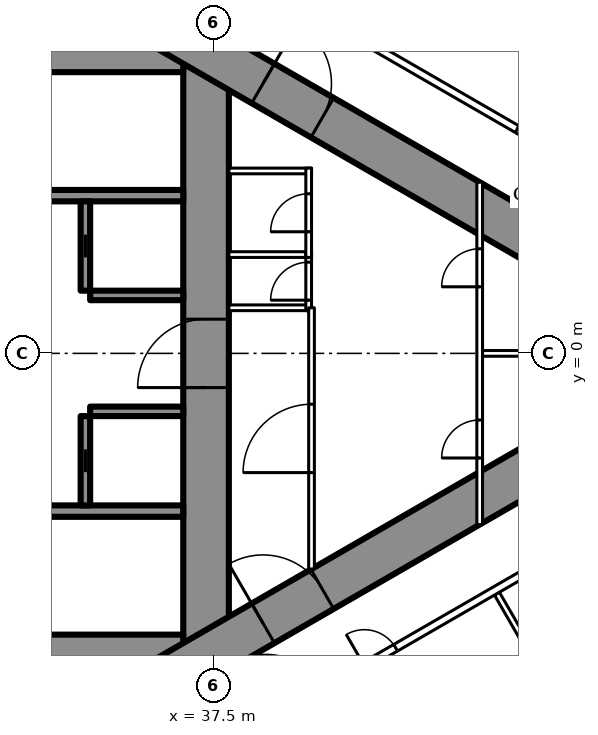
"""IFC4 building model, lengths in metres.
Left out: names, types, materials, properties, quantities, classifications, styles, units other than length and angle.
Written with IfcOpenShell. Run it as: python <this file> out.ifc"""

import sys

from ifc_helpers import new_model, si_unit, direction, frame, frame_2d, origin, place, context, subcontext, project, spatial, rectangle, extrude, element, fill, save


model = new_model("IFC4")
c1 = context("Model", 3, precision=1e-05, world=origin(), true_north=direction((0.0, 1.0)))
c2 = subcontext(c1, "Body", "Model", "MODEL_VIEW")
j1 = project(units=[si_unit("LENGTHUNIT", "METRE"), si_unit("PLANEANGLEUNIT", "RADIAN")], contexts=[c1])
p1 = place(None, origin())
s1 = spatial("IfcSite", under=j1, at=p1, CompositionType="ELEMENT")
p2 = place(p1, origin())
s2 = spatial("IfcBuilding", under=s1, at=p2, CompositionType="ELEMENT")
p3 = place(p2, frame((0.0, 0.0, 90.6)))
s3 = spatial("IfcBuildingStorey", under=s2, at=p3, CompositionType="ELEMENT", Elevation=90.6)
p4 = place(p3, frame((37.3, -8.6, 0.0), z_axis=(0.0, 0.0, 1.0), x_axis=(0.0, 1.0, 0.0)))
e1 = element("IfcWall", 1, at=p4, inside=s3, PredefinedType="SHEAR", context=c2, shape_type="SweptSolid", body=[
    extrude(rectangle(XDim=17.2, YDim=1.2, at=frame_2d((8.6, 0.0))), origin(), (0.0, 0.0, 1.0), 3.5),
])
p5 = place(p4, frame((7.7, 0.0, 0.0)))
e2 = element("IfcOpeningElement", 2, at=p5, cuts=e1, PredefinedType="OPENING", context=c2, shape_type="SweptSolid", body=[
    extrude(rectangle(XDim=1.8, YDim=2.2, at=frame_2d((0.9, 1.1))), frame((0.0, 0.61, 0.0), z_axis=(0.0, -1.0, 0.0), x_axis=(1.0, 0.0, 0.0)), (0.0, 0.0, 1.0), 1.22),
])
p6 = place(p3, frame((28.3, -8.0, 0.0), z_axis=(0.0, 0.0, 1.0), x_axis=(1.0, 0.0, 0.0)))
e3 = element("IfcWall", 3, at=p6, inside=s3, PredefinedType="SHEAR", context=c2, shape_type="SweptSolid", body=[
    extrude(rectangle(XDim=8.4, YDim=1.2, at=frame_2d((4.2, 0.0))), origin(), (0.0, 0.0, 1.0), 3.5),
])
p7 = place(p6, frame((0.25, 0.0, 0.0)))
e4 = element("IfcOpeningElement", 4, at=p7, cuts=e3, PredefinedType="OPENING", context=c2, shape_type="SweptSolid", body=[
    extrude(rectangle(XDim=1.0, YDim=2.2, at=frame_2d((0.5, 1.1))), frame((0.0, 0.61, 0.0), z_axis=(0.0, -1.0, 0.0), x_axis=(1.0, 0.0, 0.0)), (0.0, 0.0, 1.0), 1.22),
])
p8 = place(p3, frame((28.3, 8.0, 0.0), z_axis=(0.0, 0.0, 1.0), x_axis=(1.0, 0.0, 0.0)))
e5 = element("IfcWall", 5, at=p8, inside=s3, PredefinedType="SHEAR", context=c2, shape_type="SweptSolid", body=[
    extrude(rectangle(XDim=8.4, YDim=1.2, at=frame_2d((4.2, 0.0))), origin(), (0.0, 0.0, 1.0), 3.5),
])
p9 = place(p8, frame((0.25, 0.0, 0.0)))
e6 = element("IfcOpeningElement", 6, at=p9, cuts=e5, PredefinedType="OPENING", context=c2, shape_type="SweptSolid", body=[
    extrude(rectangle(XDim=1.0, YDim=2.2, at=frame_2d((0.5, 1.1))), frame((0.0, 0.61, 0.0), z_axis=(0.0, -1.0, 0.0), x_axis=(1.0, 0.0, 0.0)), (0.0, 0.0, 1.0), 1.22),
])
for number, where, z_axis, x_axis in (
    (7, (28.3, -4.15, 0.0), (0.0, 0.0, 1.0), (1.0, 0.0, 0.0)),
    (8, (28.3, 4.15, 0.0), (0.0, 0.0, 1.0), (1.0, 0.0, 0.0)),
):
    element("IfcWall", number, at=place(p3, frame(where, z_axis=z_axis, x_axis=x_axis)), inside=s3, PredefinedType="SHEAR", context=c2, shape_type="SweptSolid", body=[
        extrude(rectangle(XDim=8.4, YDim=0.3, at=frame_2d((4.2, 0.0))), origin(), (0.0, 0.0, 1.0), 3.5),
    ])
p10 = place(p3, frame((34.125, -4.0, 0.0), z_axis=(0.0, 0.0, 1.0), x_axis=(0.0, 1.0, 0.0)))
e9 = element("IfcWall", 9, at=p10, inside=s3, PredefinedType="SHEAR", context=c2, shape_type="SweptSolid", body=[
    extrude(rectangle(XDim=2.35, YDim=0.25, at=frame_2d((1.175, 0.0))), origin(), (0.0, 0.0, 1.0), 3.5),
])
p11 = place(p10, frame((0.875, 0.0, 0.0)))
e10 = element("IfcOpeningElement", 10, at=p11, cuts=e9, PredefinedType="OPENING", context=c2, shape_type="SweptSolid", body=[
    extrude(rectangle(XDim=0.6, YDim=2.0, at=frame_2d((0.3, 1.0))), frame((0.0, 0.135, 0.0), z_axis=(0.0, -1.0, 0.0), x_axis=(1.0, 0.0, 0.0)), (0.0, 0.0, 1.0), 0.27),
])
p12 = place(p3, frame((34.25, -1.525, 0.0), z_axis=(0.0, 0.0, 1.0), x_axis=(1.0, 0.0, 0.0)))
e11 = element("IfcWall", 11, at=p12, inside=s3, PredefinedType="SHEAR", context=c2, shape_type="SweptSolid", body=[
    extrude(rectangle(XDim=2.45, YDim=0.25, at=frame_2d((1.225, 0.0))), origin(), (0.0, 0.0, 1.0), 3.5),
])
p13 = place(p3, frame((34.125, 1.65, 0.0), z_axis=(0.0, 0.0, 1.0), x_axis=(0.0, 1.0, 0.0)))
e12 = element("IfcWall", 12, at=p13, inside=s3, PredefinedType="SHEAR", context=c2, shape_type="SweptSolid", body=[
    extrude(rectangle(XDim=2.35, YDim=0.25, at=frame_2d((1.175, 0.0))), origin(), (0.0, 0.0, 1.0), 3.5),
])
p14 = place(p13, frame((0.875, 0.0, 0.0)))
e13 = element("IfcOpeningElement", 13, at=p14, cuts=e12, PredefinedType="OPENING", context=c2, shape_type="SweptSolid", body=[
    extrude(rectangle(XDim=0.6, YDim=2.0, at=frame_2d((0.3, 1.0))), frame((0.0, 0.135, 0.0), z_axis=(0.0, -1.0, 0.0), x_axis=(1.0, 0.0, 0.0)), (0.0, 0.0, 1.0), 0.27),
])
p15 = place(p3, frame((34.25, 1.525, 0.0), z_axis=(0.0, 0.0, 1.0), x_axis=(1.0, 0.0, 0.0)))
e14 = element("IfcWall", 14, at=p15, inside=s3, PredefinedType="SHEAR", context=c2, shape_type="SweptSolid", body=[
    extrude(rectangle(XDim=2.45, YDim=0.25, at=frame_2d((1.225, 0.0))), origin(), (0.0, 0.0, 1.0), 3.5),
])
p16 = place(p3, frame((27.2, -13.8, 0.0), z_axis=(0.0, 0.0, 1.0), x_axis=(0.866027159892, 0.499996958321, 0.0)))
e15 = element("IfcWall", 15, at=p16, inside=s3, PredefinedType="SHEAR", context=c2, shape_type="SweptSolid", body=[
    extrude(rectangle(XDim=27.947, YDim=1.2, at=frame_2d((13.973, 0.0))), origin(), (0.0, 0.0, 1.0), 3.5),
])
p17 = place(p16, frame((4.6, 0.0, 0.0)))
e16 = element("IfcOpeningElement", 16, at=p17, cuts=e15, PredefinedType="OPENING", context=c2, shape_type="SweptSolid", body=[
    extrude(rectangle(XDim=1.0, YDim=2.2, at=frame_2d((0.5, 1.1))), frame((0.0, 0.61, 0.0), z_axis=(0.0, -1.0, 0.0), x_axis=(1.0, 0.0, 0.0)), (0.0, 0.0, 1.0), 1.22),
])
p18 = place(p16, frame((13.395, 0.0, 0.0)))
e17 = element("IfcOpeningElement", 17, at=p18, cuts=e15, PredefinedType="OPENING", context=c2, shape_type="SweptSolid", body=[
    extrude(rectangle(XDim=1.8, YDim=2.2, at=frame_2d((0.9, 1.1))), frame((0.0, 0.61, 0.0), z_axis=(0.0, -1.0, 0.0), x_axis=(1.0, 0.0, 0.0)), (0.0, 0.0, 1.0), 1.22),
])
p19 = place(p3, frame((27.2, 13.8, 0.0), z_axis=(0.0, 0.0, 1.0), x_axis=(0.866024515034, -0.500001539357, 0.0)))
e18 = element("IfcWall", 18, at=p19, inside=s3, PredefinedType="SHEAR", context=c2, shape_type="SweptSolid", body=[
    extrude(rectangle(XDim=26.907, YDim=1.2, at=frame_2d((13.454, 0.0))), origin(), (0.0, 0.0, 1.0), 3.5),
])
p20 = place(p19, frame((4.6, 0.0, 0.0)))
e19 = element("IfcOpeningElement", 19, at=p20, cuts=e18, PredefinedType="OPENING", context=c2, shape_type="SweptSolid", body=[
    extrude(rectangle(XDim=1.0, YDim=2.2, at=frame_2d((0.5, 1.1))), frame((0.0, 0.61, 0.0), z_axis=(0.0, -1.0, 0.0), x_axis=(1.0, 0.0, 0.0)), (0.0, 0.0, 1.0), 1.22),
])
p21 = place(p19, frame((13.395, 0.0, 0.0)))
e20 = element("IfcOpeningElement", 20, at=p21, cuts=e18, PredefinedType="OPENING", context=c2, shape_type="SweptSolid", body=[
    extrude(rectangle(XDim=1.8, YDim=2.2, at=frame_2d((0.9, 1.1))), frame((0.0, 0.61, 0.0), z_axis=(0.0, -1.0, 0.0), x_axis=(1.0, 0.0, 0.0)), (0.0, 0.0, 1.0), 1.22),
])
p22 = place(p3, frame((44.954, -6.321, 0.0), z_axis=(0.0, 0.0, 1.0), x_axis=(0.500018676722, -0.866014620505, 0.0)))
e21 = element("IfcWall", 21, at=p22, inside=s3, PredefinedType="PARTITIONING", context=c2, shape_type="SweptSolid", body=[
    extrude(rectangle(XDim=8.704, YDim=0.15, at=frame_2d((4.352, 0.0))), origin(), (0.0, 0.0, 1.0), 2.2),
])
p23 = place(p3, frame((37.96, -10.243, 0.0), z_axis=(0.0, 0.0, 1.0), x_axis=(0.866026429433, 0.499998223521, 0.0)))
e22 = element("IfcWall", 22, at=p23, inside=s3, PredefinedType="PARTITIONING", context=c2, shape_type="SweptSolid", body=[
    extrude(rectangle(XDim=20.487, YDim=0.2, at=frame_2d((10.243, 0.0))), origin(), (0.0, 0.0, 1.0), 3.25),
])
p24 = place(p23, frame((4.047, 0.0, 0.0)))
e23 = element("IfcOpeningElement", 23, at=p24, cuts=e22, PredefinedType="OPENING", context=c2, shape_type="SweptSolid", body=[
    extrude(rectangle(XDim=0.95, YDim=2.2, at=frame_2d((0.475, 1.1))), frame((0.0, 0.11, 0.0), z_axis=(0.0, -1.0, 0.0), x_axis=(1.0, 0.0, 0.0)), (0.0, 0.0, 1.0), 0.22),
])
p25 = place(p23, frame((11.04, 0.0, 0.0)))
e24 = element("IfcOpeningElement", 24, at=p25, cuts=e22, PredefinedType="OPENING", context=c2, shape_type="SweptSolid", body=[
    extrude(rectangle(XDim=0.95, YDim=2.2, at=frame_2d((0.475, 1.1))), frame((0.0, 0.11, 0.0), z_axis=(0.0, -1.0, 0.0), x_axis=(1.0, 0.0, 0.0)), (0.0, 0.0, 1.0), 0.22),
])
p26 = place(p23, frame((13.035, 0.0, 0.0)))
e25 = element("IfcOpeningElement", 25, at=p26, cuts=e22, PredefinedType="OPENING", context=c2, shape_type="SweptSolid", body=[
    extrude(rectangle(XDim=0.95, YDim=2.2, at=frame_2d((0.475, 1.1))), frame((0.0, 0.11, 0.0), z_axis=(0.0, -1.0, 0.0), x_axis=(1.0, 0.0, 0.0)), (0.0, 0.0, 1.0), 0.22),
])
p27 = place(p23, frame((17.085, 0.0, 0.0)))
e26 = element("IfcOpeningElement", 26, at=p27, cuts=e22, PredefinedType="OPENING", context=c2, shape_type="SweptSolid", body=[
    extrude(rectangle(XDim=0.95, YDim=2.2, at=frame_2d((0.475, 1.1))), frame((0.0, 0.11, 0.0), z_axis=(0.0, -1.0, 0.0), x_axis=(1.0, 0.0, 0.0)), (0.0, 0.0, 1.0), 0.22),
])
p28 = place(p23, frame((1.048, 0.0, 0.0)))
e27 = element("IfcOpeningElement", 27, at=p28, cuts=e22, PredefinedType="OPENING", context=c2, shape_type="SweptSolid", body=[
    extrude(rectangle(XDim=1.8, YDim=2.2, at=frame_2d((0.9, 1.1))), frame((0.0, 0.11, 0.0), z_axis=(0.0, -1.0, 0.0), x_axis=(1.0, 0.0, 0.0)), (0.0, 0.0, 1.0), 0.22),
])
p29 = place(p3, frame((36.834, 10.894, 0.0), z_axis=(0.0, 0.0, 1.0), x_axis=(0.866028157229, -0.499995230863, 0.0)))
e28 = element("IfcWall", 28, at=p29, inside=s3, PredefinedType="PARTITIONING", context=c2, shape_type="SweptSolid", body=[
    extrude(rectangle(XDim=21.667, YDim=0.2, at=frame_2d((10.833, 0.0))), origin(), (0.0, 0.0, 1.0), 3.25),
])
p30 = place(p29, frame((14.04, 0.0, 0.0)))
e29 = element("IfcOpeningElement", 29, at=p30, cuts=e28, PredefinedType="OPENING", context=c2, shape_type="SweptSolid", body=[
    extrude(rectangle(XDim=0.95, YDim=2.2, at=frame_2d((0.475, 1.1))), frame((0.0, 0.11, 0.0), z_axis=(0.0, -1.0, 0.0), x_axis=(1.0, 0.0, 0.0)), (0.0, 0.0, 1.0), 0.22),
])
p31 = place(p29, frame((9.99, 0.0, 0.0)))
e30 = element("IfcOpeningElement", 30, at=p31, cuts=e28, PredefinedType="OPENING", context=c2, shape_type="SweptSolid", body=[
    extrude(rectangle(XDim=0.95, YDim=2.2, at=frame_2d((0.475, 1.1))), frame((0.0, 0.11, 0.0), z_axis=(0.0, -1.0, 0.0), x_axis=(1.0, 0.0, 0.0)), (0.0, 0.0, 1.0), 0.22),
])
p32 = place(p29, frame((3.35, 0.0, 0.0)))
e31 = element("IfcOpeningElement", 31, at=p32, cuts=e28, PredefinedType="OPENING", context=c2, shape_type="SweptSolid", body=[
    extrude(rectangle(XDim=1.0, YDim=2.2, at=frame_2d((0.5, 1.1))), frame((0.0, 0.11, 0.0), z_axis=(0.0, -1.0, 0.0), x_axis=(1.0, 0.0, 0.0)), (0.0, 0.0, 1.0), 0.22),
])
for number, where, z_axis, x_axis in (
    (32, (37.9, 1.2, 0.0), (0.0, 0.0, 1.0), (1.0, 0.0, 0.0)),
    (33, (37.9, 2.6, 0.0), (0.0, 0.0, 1.0), (1.0, 0.0, 0.0)),
    (34, (37.9, 4.8, 0.0), (0.0, 0.0, 1.0), (1.0, 0.0, 0.0)),
):
    element("IfcWall", number, at=place(p3, frame(where, z_axis=z_axis, x_axis=x_axis)), inside=s3, PredefinedType="PARTITIONING", context=c2, shape_type="SweptSolid", body=[
        extrude(rectangle(XDim=2.175, YDim=0.15, at=frame_2d((1.087, 0.0))), origin(), (0.0, 0.0, 1.0), 3.25),
    ])
p33 = place(p3, frame((40.0, 1.125, 0.0), z_axis=(0.0, 0.0, 1.0), x_axis=(0.0, 1.0, 0.0)))
e35 = element("IfcWall", 35, at=p33, inside=s3, PredefinedType="PARTITIONING", context=c2, shape_type="SweptSolid", body=[
    extrude(rectangle(XDim=1.55, YDim=0.15, at=frame_2d((0.775, 0.0))), origin(), (0.0, 0.0, 1.0), 3.25),
])
p34 = place(p33, frame((0.275, 0.0, 0.0)))
e36 = element("IfcOpeningElement", 36, at=p34, cuts=e35, PredefinedType="OPENING", context=c2, shape_type="SweptSolid", body=[
    extrude(rectangle(XDim=1.0, YDim=2.2, at=frame_2d((0.5, 1.1))), frame((0.0, 0.085, 0.0), z_axis=(0.0, -1.0, 0.0), x_axis=(1.0, 0.0, 0.0)), (0.0, 0.0, 1.0), 0.17),
])
p35 = place(p3, frame((40.0, 2.525, 0.0), z_axis=(0.0, 0.0, 1.0), x_axis=(0.0, 1.0, 0.0)))
e37 = element("IfcWall", 37, at=p35, inside=s3, PredefinedType="PARTITIONING", context=c2, shape_type="SweptSolid", body=[
    extrude(rectangle(XDim=2.35, YDim=0.15, at=frame_2d((1.175, 0.0))), origin(), (0.0, 0.0, 1.0), 3.25),
])
p36 = place(p35, frame((0.675, 0.0, 0.0)))
e38 = element("IfcOpeningElement", 38, at=p36, cuts=e37, PredefinedType="OPENING", context=c2, shape_type="SweptSolid", body=[
    extrude(rectangle(XDim=1.0, YDim=2.2, at=frame_2d((0.5, 1.1))), frame((0.0, 0.085, 0.0), z_axis=(0.0, -1.0, 0.0), x_axis=(1.0, 0.0, 0.0)), (0.0, 0.0, 1.0), 0.17),
])
p37 = place(p3, frame((40.075, -5.674, 0.0), z_axis=(0.0, 0.0, 1.0), x_axis=(0.0, 1.0, 0.0)))
e39 = element("IfcWall", 39, at=p37, inside=s3, PredefinedType="PARTITIONING", context=c2, shape_type="SweptSolid", body=[
    extrude(rectangle(XDim=6.874, YDim=0.15, at=frame_2d((3.437, 0.0))), origin(), (0.0, 0.0, 1.0), 3.25),
])
p38 = place(p37, frame((2.537, 0.0, 0.0)))
e40 = element("IfcOpeningElement", 40, at=p38, cuts=e39, PredefinedType="OPENING", context=c2, shape_type="SweptSolid", body=[
    extrude(rectangle(XDim=1.8, YDim=2.2, at=frame_2d((0.9, 1.1))), frame((0.0, 0.085, 0.0), z_axis=(0.0, -1.0, 0.0), x_axis=(1.0, 0.0, 0.0)), (0.0, 0.0, 1.0), 0.17),
])
p39 = place(p3, frame((44.5, -4.505, 0.0), z_axis=(0.0, 0.0, 1.0), x_axis=(0.0, 1.0, 0.0)))
e41 = element("IfcWall", 41, at=p39, inside=s3, PredefinedType="PARTITIONING", context=c2, shape_type="SweptSolid", body=[
    extrude(rectangle(XDim=9.009, YDim=0.15, at=frame_2d((4.505, 0.0))), origin(), (0.0, 0.0, 1.0), 2.45),
])
p40 = place(p39, frame((1.752, 0.0, 0.0)))
e42 = element("IfcOpeningElement", 42, at=p40, cuts=e41, PredefinedType="OPENING", context=c2, shape_type="SweptSolid", body=[
    extrude(rectangle(XDim=1.0, YDim=2.2, at=frame_2d((0.5, 1.1))), frame((0.0, 0.085, 0.0), z_axis=(0.0, -1.0, 0.0), x_axis=(1.0, 0.0, 0.0)), (0.0, 0.0, 1.0), 0.17),
])
p41 = place(p39, frame((6.257, 0.0, 0.0)))
e43 = element("IfcOpeningElement", 43, at=p41, cuts=e41, PredefinedType="OPENING", context=c2, shape_type="SweptSolid", body=[
    extrude(rectangle(XDim=1.0, YDim=2.2, at=frame_2d((0.5, 1.1))), frame((0.0, 0.085, 0.0), z_axis=(0.0, -1.0, 0.0), x_axis=(1.0, 0.0, 0.0)), (0.0, 0.0, 1.0), 0.17),
])
p42 = place(p3, frame((44.575, 0.0, 0.0), z_axis=(0.0, 0.0, 1.0), x_axis=(1.0, 0.0, 0.0)))
e44 = element("IfcWall", 44, at=p42, inside=s3, PredefinedType="PARTITIONING", context=c2, shape_type="SweptSolid", body=[
    extrude(rectangle(XDim=7.727, YDim=0.15, at=frame_2d((3.864, 0.0))), origin(), (0.0, 0.0, 1.0), 2.2),
])
p43 = place(p24, origin())
e45 = element("IfcDoor", 45, at=p43, inside=s3, OperationType="SINGLE_SWING_LEFT", PredefinedType="DOOR", context=c2, shape_type="SweptSolid", body=[
    extrude(rectangle(XDim=0.95, YDim=2.2, at=frame_2d((0.475, 1.1))), frame((0.0, 0.025, 0.0), z_axis=(0.0, -1.0, 0.0), x_axis=(1.0, 0.0, 0.0)), (0.0, 0.0, 1.0), 0.05),
])
fill(e23, e45)
p44 = place(p31, origin())
e46 = element("IfcDoor", 46, at=p44, inside=s3, OperationType="SINGLE_SWING_LEFT", PredefinedType="DOOR", context=c2, shape_type="SweptSolid", body=[
    extrude(rectangle(XDim=0.95, YDim=2.2, at=frame_2d((0.475, 1.1))), frame((0.0, 0.025, 0.0), z_axis=(0.0, -1.0, 0.0), x_axis=(1.0, 0.0, 0.0)), (0.0, 0.0, 1.0), 0.05),
])
fill(e30, e46)
p45 = place(p34, origin())
e47 = element("IfcDoor", 47, at=p45, inside=s3, OperationType="SINGLE_SWING_LEFT", PredefinedType="DOOR", context=c2, shape_type="SweptSolid", body=[
    extrude(rectangle(XDim=1.0, YDim=2.2, at=frame_2d((0.5, 1.1))), frame((0.0, 0.025, 0.0), z_axis=(0.0, -1.0, 0.0), x_axis=(1.0, 0.0, 0.0)), (0.0, 0.0, 1.0), 0.05),
])
fill(e36, e47)
p46 = place(p36, origin())
e48 = element("IfcDoor", 48, at=p46, inside=s3, OperationType="SINGLE_SWING_LEFT", PredefinedType="DOOR", context=c2, shape_type="SweptSolid", body=[
    extrude(rectangle(XDim=1.0, YDim=2.2, at=frame_2d((0.5, 1.1))), frame((0.0, 0.025, 0.0), z_axis=(0.0, -1.0, 0.0), x_axis=(1.0, 0.0, 0.0)), (0.0, 0.0, 1.0), 0.05),
])
fill(e38, e48)
p47 = place(p38, origin())
e49 = element("IfcDoor", 49, at=p47, inside=s3, OperationType="DOUBLE_DOOR_SINGLE_SWING", PredefinedType="DOOR", context=c2, shape_type="SweptSolid", body=[
    extrude(rectangle(XDim=1.8, YDim=2.2, at=frame_2d((0.9, 1.1))), frame((0.0, 0.025, 0.0), z_axis=(0.0, -1.0, 0.0), x_axis=(1.0, 0.0, 0.0)), (0.0, 0.0, 1.0), 0.05),
])
fill(e40, e49)
p48 = place(p40, origin())
e50 = element("IfcDoor", 50, at=p48, inside=s3, OperationType="SINGLE_SWING_LEFT", PredefinedType="DOOR", context=c2, shape_type="SweptSolid", body=[
    extrude(rectangle(XDim=1.0, YDim=2.2, at=frame_2d((0.5, 1.1))), frame((0.0, 0.025, 0.0), z_axis=(0.0, -1.0, 0.0), x_axis=(1.0, 0.0, 0.0)), (0.0, 0.0, 1.0), 0.05),
])
fill(e42, e50)
p49 = place(p41, origin())
e51 = element("IfcDoor", 51, at=p49, inside=s3, OperationType="SINGLE_SWING_LEFT", PredefinedType="DOOR", context=c2, shape_type="SweptSolid", body=[
    extrude(rectangle(XDim=1.0, YDim=2.2, at=frame_2d((0.5, 1.1))), frame((0.0, 0.025, 0.0), z_axis=(0.0, -1.0, 0.0), x_axis=(1.0, 0.0, 0.0)), (0.0, 0.0, 1.0), 0.05),
])
fill(e43, e51)
p50 = place(p18, origin())
e52 = element("IfcDoor", 52, at=p50, inside=s3, OperationType="DOUBLE_DOOR_SINGLE_SWING", PredefinedType="DOOR", context=c2, shape_type="SweptSolid", body=[
    extrude(rectangle(XDim=1.8, YDim=2.2, at=frame_2d((0.9, 1.1))), frame((0.0, 0.025, 0.0), z_axis=(0.0, -1.0, 0.0), x_axis=(1.0, 0.0, 0.0)), (0.0, 0.0, 1.0), 0.05),
])
fill(e17, e52)
p51 = place(p21, origin())
e53 = element("IfcDoor", 53, at=p51, inside=s3, OperationType="DOUBLE_DOOR_SINGLE_SWING", PredefinedType="DOOR", context=c2, shape_type="SweptSolid", body=[
    extrude(rectangle(XDim=1.8, YDim=2.2, at=frame_2d((0.9, 1.1))), frame((0.0, 0.025, 0.0), z_axis=(0.0, -1.0, 0.0), x_axis=(1.0, 0.0, 0.0)), (0.0, 0.0, 1.0), 0.05),
])
fill(e20, e53)
p52 = place(p5, origin())
e54 = element("IfcDoor", 54, at=p52, inside=s3, OperationType="DOUBLE_DOOR_SINGLE_SWING", PredefinedType="DOOR", context=c2, shape_type="SweptSolid", body=[
    extrude(rectangle(XDim=1.8, YDim=2.2, at=frame_2d((0.9, 1.1))), frame((0.0, 0.025, 0.0), z_axis=(0.0, -1.0, 0.0), x_axis=(1.0, 0.0, 0.0)), (0.0, 0.0, 1.0), 0.05),
])
fill(e2, e54)
p53 = place(p11, origin())
e55 = element("IfcDoor", 55, at=p53, inside=s3, OperationType="SLIDING_TO_LEFT", PredefinedType="DOOR", context=c2, shape_type="SweptSolid", body=[
    extrude(rectangle(XDim=0.6, YDim=2.0, at=frame_2d((0.3, 1.0))), frame((0.0, 0.025, 0.0), z_axis=(0.0, -1.0, 0.0), x_axis=(1.0, 0.0, 0.0)), (0.0, 0.0, 1.0), 0.05),
])
fill(e10, e55)
p54 = place(p14, origin())
e56 = element("IfcDoor", 56, at=p54, inside=s3, OperationType="SLIDING_TO_LEFT", PredefinedType="DOOR", context=c2, shape_type="SweptSolid", body=[
    extrude(rectangle(XDim=0.6, YDim=2.0, at=frame_2d((0.3, 1.0))), frame((0.0, 0.025, 0.0), z_axis=(0.0, -1.0, 0.0), x_axis=(1.0, 0.0, 0.0)), (0.0, 0.0, 1.0), 0.05),
])
fill(e13, e56)
save(model, sys.argv[1])
